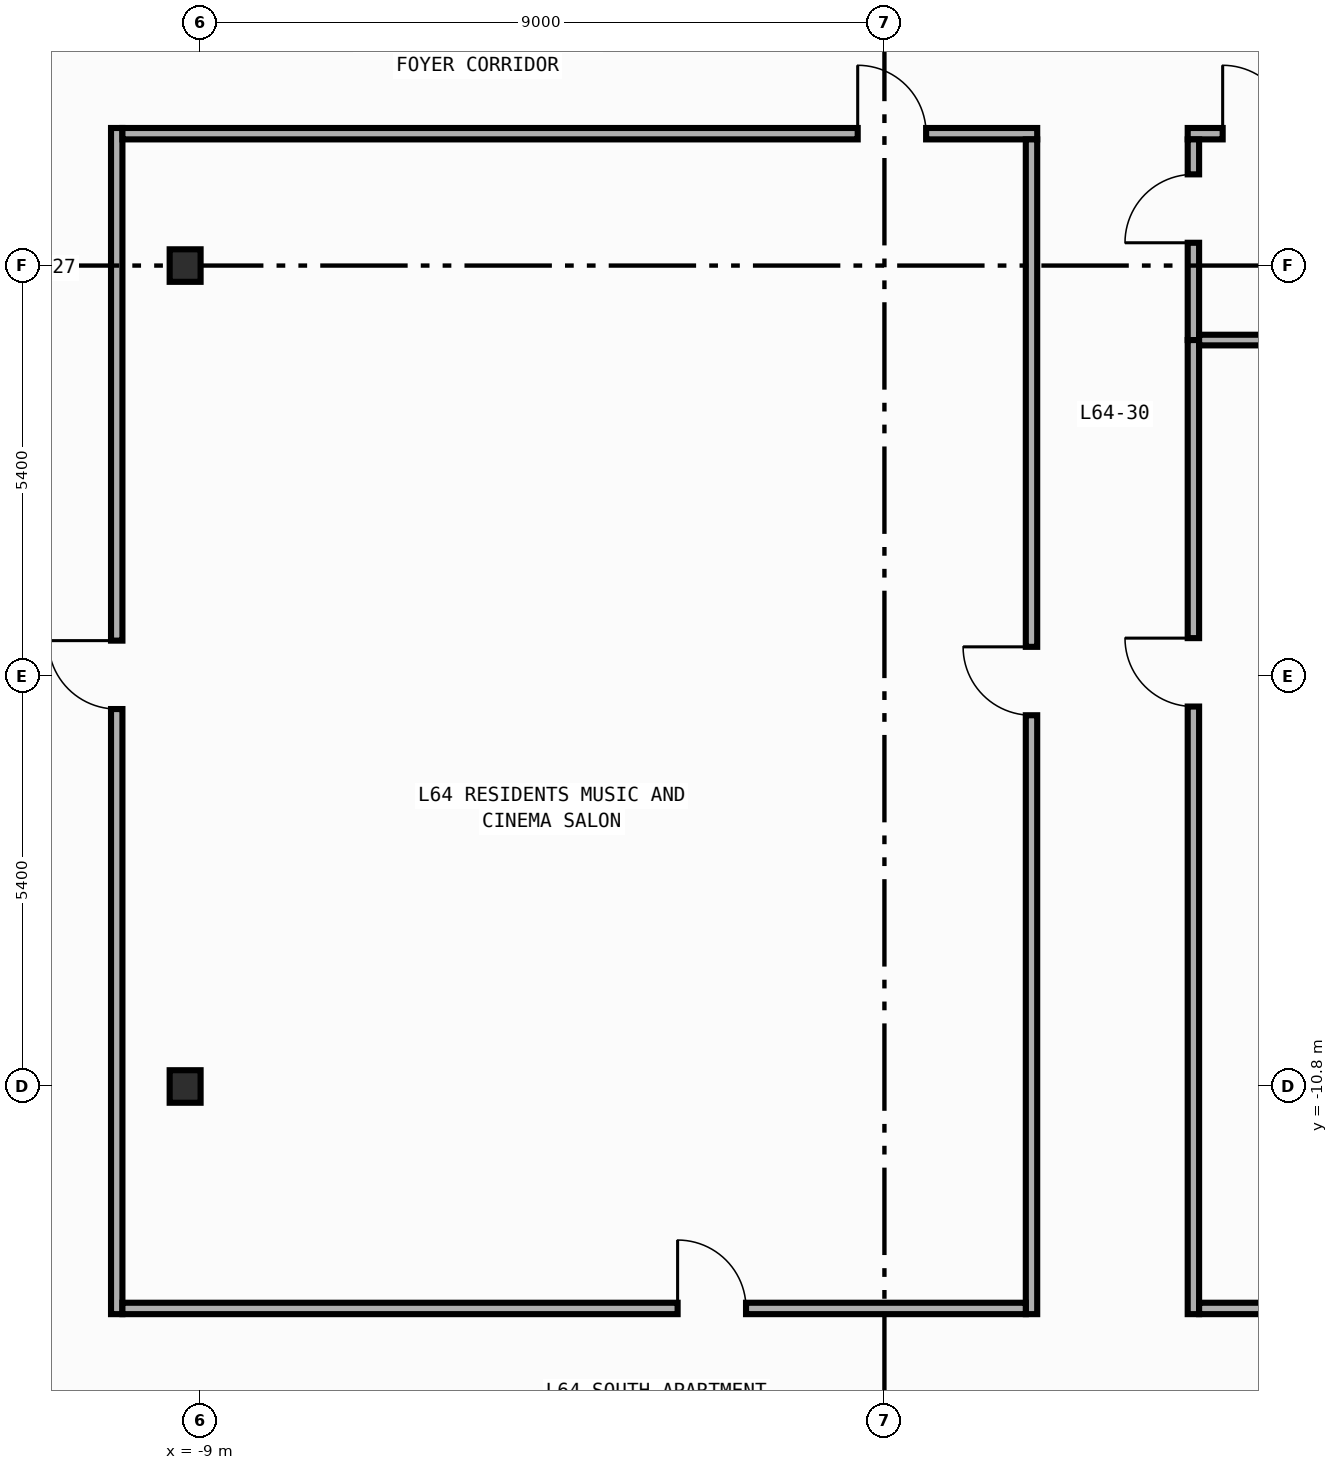
"""IFC4 building model, lengths in metres.
Left out: names, types, materials, properties, quantities, classifications, styles, units other than length and angle.
Written with IfcOpenShell. Run it as: python <this file> out.ifc"""

import sys

from ifc_helpers import new_model, si_unit, direction, frame, frame_2d, origin, origin_2d, place, context, subcontext, project, spatial, rectangle, i_section, extrude, element, fill, save


model = new_model("IFC4")
c1 = context("Model", 3, precision=1e-05, world=origin(), true_north=direction((0.0, 1.0)))
c2 = subcontext(c1, "Body", "Model", "MODEL_VIEW")
j1 = project(units=[si_unit("LENGTHUNIT", "METRE"), si_unit("PLANEANGLEUNIT", "RADIAN")], contexts=[c1])
p1 = place(None, origin())
s1 = spatial("IfcSite", under=j1, at=p1, CompositionType="ELEMENT")
p2 = place(p1, origin())
s2 = spatial("IfcBuilding", under=s1, at=p2, CompositionType="ELEMENT")
p3 = place(p2, frame((0.0, 0.0, 269.2)))
s3 = spatial("IfcBuildingStorey", under=s2, at=p3, CompositionType="ELEMENT", Elevation=269.2)
for number, where, z_axis, x_axis in (
    (1, (-9.2, -10.8, 0.0), (0.0, 0.0, 1.0), (1.0, 0.0, 0.0)),
    (2, (-9.2, 0.0, 0.0), (0.0, 0.0, 1.0), (1.0, 0.0, 0.0)),
):
    element("IfcColumn", number, at=place(p3, frame(where, z_axis=z_axis, x_axis=x_axis)), inside=s3, PredefinedType="COLUMN", context=c2, shape_type="SweptSolid", body=[
        extrude(i_section(OverallWidth=0.407, OverallDepth=0.428, WebThickness=0.02, FlangeThickness=0.035, FilletRadius=0.022, at=origin_2d()), origin(), (0.0, 0.0, 1.0), 3.6),
    ])
p4 = place(p3, frame((-10.1, -13.795, 0.0), z_axis=(0.0, 0.0, 1.0), x_axis=(0.0, 1.0, 0.0)))
e3 = element("IfcWall", 3, at=p4, inside=s3, PredefinedType="PARTITIONING", context=c2, shape_type="SweptSolid", body=[
    extrude(rectangle(XDim=15.605, YDim=0.15, at=frame_2d((7.802, 0.0))), origin(), (0.0, 0.0, 1.0), 3.25),
])
p5 = place(p4, frame((7.961, 0.0, 0.0)))
e4 = element("IfcOpeningElement", 4, at=p5, cuts=e3, PredefinedType="OPENING", context=c2, shape_type="SweptSolid", body=[
    extrude(rectangle(XDim=0.9, YDim=2.15, at=frame_2d((0.45, 1.075))), frame((0.0, 0.085, 0.0), z_axis=(0.0, -1.0, 0.0), x_axis=(1.0, 0.0, 0.0)), (0.0, 0.0, 1.0), 0.17),
])
p6 = place(p3, frame((-10.025, 1.735, 0.0), z_axis=(0.0, 0.0, 1.0), x_axis=(1.0, 0.0, 0.0)))
e5 = element("IfcWall", 5, at=p6, inside=s3, PredefinedType="PARTITIONING", context=c2, shape_type="SweptSolid", body=[
    extrude(rectangle(XDim=12.035, YDim=0.15, at=frame_2d((6.018, 0.0))), origin(), (0.0, 0.0, 1.0), 3.25),
])
p7 = place(p6, frame((9.674, 0.0, 0.0)))
e6 = element("IfcOpeningElement", 6, at=p7, cuts=e5, PredefinedType="OPENING", context=c2, shape_type="SweptSolid", body=[
    extrude(rectangle(XDim=0.9, YDim=2.15, at=frame_2d((0.45, 1.075))), frame((0.0, 0.085, 0.0), z_axis=(0.0, -1.0, 0.0), x_axis=(1.0, 0.0, 0.0)), (0.0, 0.0, 1.0), 0.17),
])
p8 = place(p3, frame((3.99, 1.735, 0.0), z_axis=(0.0, 0.0, 1.0), x_axis=(1.0, 0.0, 0.0)))
e7 = element("IfcWall", 7, at=p8, inside=s3, PredefinedType="PARTITIONING", context=c2, shape_type="SweptSolid", body=[
    extrude(rectangle(XDim=3.05, YDim=0.15, at=frame_2d((1.525, 0.0))), origin(), (0.0, 0.0, 1.0), 3.25),
])
p9 = place(p8, frame((0.46, 0.0, 0.0)))
e8 = element("IfcOpeningElement", 8, at=p9, cuts=e7, PredefinedType="OPENING", context=c2, shape_type="SweptSolid", body=[
    extrude(rectangle(XDim=0.9, YDim=2.15, at=frame_2d((0.45, 1.075))), frame((0.0, 0.085, 0.0), z_axis=(0.0, -1.0, 0.0), x_axis=(1.0, 0.0, 0.0)), (0.0, 0.0, 1.0), 0.17),
])
p10 = place(p3, frame((1.935, -13.795, 0.0), z_axis=(0.0, 0.0, 1.0), x_axis=(0.0, 1.0, 0.0)))
e9 = element("IfcWall", 9, at=p10, inside=s3, PredefinedType="PARTITIONING", context=c2, shape_type="SweptSolid", body=[
    extrude(rectangle(XDim=15.455, YDim=0.15, at=frame_2d((7.728, 0.0))), origin(), (0.0, 0.0, 1.0), 3.25),
])
p11 = place(p10, frame((7.879, 0.0, 0.0)))
e10 = element("IfcOpeningElement", 10, at=p11, cuts=e9, PredefinedType="OPENING", context=c2, shape_type="SweptSolid", body=[
    extrude(rectangle(XDim=0.9, YDim=2.15, at=frame_2d((0.45, 1.075))), frame((0.0, 0.085, 0.0), z_axis=(0.0, -1.0, 0.0), x_axis=(1.0, 0.0, 0.0)), (0.0, 0.0, 1.0), 0.17),
])
p12 = place(p3, frame((4.065, -0.98, 0.0), z_axis=(0.0, 0.0, 1.0), x_axis=(0.0, 1.0, 0.0)))
e11 = element("IfcWall", 11, at=p12, inside=s3, PredefinedType="PARTITIONING", context=c2, shape_type="SweptSolid", body=[
    extrude(rectangle(XDim=2.64, YDim=0.15, at=frame_2d((1.32, 0.0))), origin(), (0.0, 0.0, 1.0), 3.25),
])
p13 = place(p12, frame((1.28, 0.0, 0.0)))
e12 = element("IfcOpeningElement", 12, at=p13, cuts=e11, PredefinedType="OPENING", context=c2, shape_type="SweptSolid", body=[
    extrude(rectangle(XDim=0.9, YDim=2.15, at=frame_2d((0.45, 1.075))), frame((0.0, 0.085, 0.0), z_axis=(0.0, -1.0, 0.0), x_axis=(1.0, 0.0, 0.0)), (0.0, 0.0, 1.0), 0.17),
])
p14 = place(p3, frame((4.065, -13.795, 0.0), z_axis=(0.0, 0.0, 1.0), x_axis=(0.0, 1.0, 0.0)))
e13 = element("IfcWall", 13, at=p14, inside=s3, PredefinedType="PARTITIONING", context=c2, shape_type="SweptSolid", body=[
    extrude(rectangle(XDim=12.815, YDim=0.15, at=frame_2d((6.407, 0.0))), origin(), (0.0, 0.0, 1.0), 3.25),
])
p15 = place(p14, frame((7.994, 0.0, 0.0)))
e14 = element("IfcOpeningElement", 14, at=p15, cuts=e13, PredefinedType="OPENING", context=c2, shape_type="SweptSolid", body=[
    extrude(rectangle(XDim=0.9, YDim=2.15, at=frame_2d((0.45, 1.075))), frame((0.0, 0.085, 0.0), z_axis=(0.0, -1.0, 0.0), x_axis=(1.0, 0.0, 0.0)), (0.0, 0.0, 1.0), 0.17),
])
p16 = place(p3, frame((-10.025, -13.72, 0.0), z_axis=(0.0, 0.0, 1.0), x_axis=(1.0, 0.0, 0.0)))
e15 = element("IfcWall", 15, at=p16, inside=s3, PredefinedType="PARTITIONING", context=c2, shape_type="SweptSolid", body=[
    extrude(rectangle(XDim=11.885, YDim=0.15, at=frame_2d((5.942, 0.0))), origin(), (0.0, 0.0, 1.0), 3.25),
])
p17 = place(p16, frame((7.304, 0.0, 0.0)))
e16 = element("IfcOpeningElement", 16, at=p17, cuts=e15, PredefinedType="OPENING", context=c2, shape_type="SweptSolid", body=[
    extrude(rectangle(XDim=0.9, YDim=2.15, at=frame_2d((0.45, 1.075))), frame((0.0, 0.085, 0.0), z_axis=(0.0, -1.0, 0.0), x_axis=(1.0, 0.0, 0.0)), (0.0, 0.0, 1.0), 0.17),
])
p18 = place(p3, frame((4.14, -13.72, 0.0), z_axis=(0.0, 0.0, 1.0), x_axis=(1.0, 0.0, 0.0)))
e17 = element("IfcWall", 17, at=p18, inside=s3, PredefinedType="PARTITIONING", context=c2, shape_type="SweptSolid", body=[
    extrude(rectangle(XDim=5.885, YDim=0.15, at=frame_2d((2.942, 0.0))), origin(), (0.0, 0.0, 1.0), 3.25),
])
p19 = place(p18, frame((0.866, 0.0, 0.0)))
e18 = element("IfcOpeningElement", 18, at=p19, cuts=e17, PredefinedType="OPENING", context=c2, shape_type="SweptSolid", body=[
    extrude(rectangle(XDim=0.9, YDim=2.15, at=frame_2d((0.45, 1.075))), frame((0.0, 0.085, 0.0), z_axis=(0.0, -1.0, 0.0), x_axis=(1.0, 0.0, 0.0)), (0.0, 0.0, 1.0), 0.17),
])
p20 = place(p3, frame((4.14, -0.98, 0.0), z_axis=(0.0, 0.0, 1.0), x_axis=(1.0, 0.0, 0.0)))
e19 = element("IfcWall", 19, at=p20, inside=s3, PredefinedType="PARTITIONING", context=c2, shape_type="SweptSolid", body=[
    extrude(rectangle(XDim=2.9, YDim=0.14, at=frame_2d((1.45, 0.0))), origin(), (0.0, 0.0, 1.0), 3.25),
])
p21 = place(p5, origin())
e20 = element("IfcDoor", 20, at=p21, inside=s3, OperationType="SINGLE_SWING_RIGHT", PredefinedType="DOOR", context=c2, shape_type="SweptSolid", body=[
    extrude(rectangle(XDim=0.9, YDim=2.15, at=frame_2d((0.45, 1.075))), frame((0.0, 0.025, 0.0), z_axis=(0.0, -1.0, 0.0), x_axis=(1.0, 0.0, 0.0)), (0.0, 0.0, 1.0), 0.05),
])
fill(e4, e20)
p22 = place(p7, origin())
e21 = element("IfcDoor", 21, at=p22, inside=s3, OperationType="SINGLE_SWING_LEFT", PredefinedType="DOOR", context=c2, shape_type="SweptSolid", body=[
    extrude(rectangle(XDim=0.9, YDim=2.15, at=frame_2d((0.45, 1.075))), frame((0.0, 0.025, 0.0), z_axis=(0.0, -1.0, 0.0), x_axis=(1.0, 0.0, 0.0)), (0.0, 0.0, 1.0), 0.05),
])
fill(e6, e21)
p23 = place(p9, origin())
e22 = element("IfcDoor", 22, at=p23, inside=s3, OperationType="SINGLE_SWING_LEFT", PredefinedType="DOOR", context=c2, shape_type="SweptSolid", body=[
    extrude(rectangle(XDim=0.9, YDim=2.15, at=frame_2d((0.45, 1.075))), frame((0.0, 0.025, 0.0), z_axis=(0.0, -1.0, 0.0), x_axis=(1.0, 0.0, 0.0)), (0.0, 0.0, 1.0), 0.05),
])
fill(e8, e22)
p24 = place(p11, origin())
e23 = element("IfcDoor", 23, at=p24, inside=s3, OperationType="SINGLE_SWING_RIGHT", PredefinedType="DOOR", context=c2, shape_type="SweptSolid", body=[
    extrude(rectangle(XDim=0.9, YDim=2.15, at=frame_2d((0.45, 1.075))), frame((0.0, 0.025, 0.0), z_axis=(0.0, -1.0, 0.0), x_axis=(1.0, 0.0, 0.0)), (0.0, 0.0, 1.0), 0.05),
])
fill(e10, e23)
p25 = place(p13, origin())
e24 = element("IfcDoor", 24, at=p25, inside=s3, OperationType="SINGLE_SWING_LEFT", PredefinedType="DOOR", context=c2, shape_type="SweptSolid", body=[
    extrude(rectangle(XDim=0.9, YDim=2.15, at=frame_2d((0.45, 1.075))), frame((0.0, 0.025, 0.0), z_axis=(0.0, -1.0, 0.0), x_axis=(1.0, 0.0, 0.0)), (0.0, 0.0, 1.0), 0.05),
])
fill(e12, e24)
p26 = place(p15, origin())
e25 = element("IfcDoor", 25, at=p26, inside=s3, OperationType="SINGLE_SWING_RIGHT", PredefinedType="DOOR", context=c2, shape_type="SweptSolid", body=[
    extrude(rectangle(XDim=0.9, YDim=2.15, at=frame_2d((0.45, 1.075))), frame((0.0, 0.025, 0.0), z_axis=(0.0, -1.0, 0.0), x_axis=(1.0, 0.0, 0.0)), (0.0, 0.0, 1.0), 0.05),
])
fill(e14, e25)
p27 = place(p17, origin())
e26 = element("IfcDoor", 26, at=p27, inside=s3, OperationType="SINGLE_SWING_LEFT", PredefinedType="DOOR", context=c2, shape_type="SweptSolid", body=[
    extrude(rectangle(XDim=0.9, YDim=2.15, at=frame_2d((0.45, 1.075))), frame((0.0, 0.025, 0.0), z_axis=(0.0, -1.0, 0.0), x_axis=(1.0, 0.0, 0.0)), (0.0, 0.0, 1.0), 0.05),
])
fill(e16, e26)
save(model, sys.argv[1])
